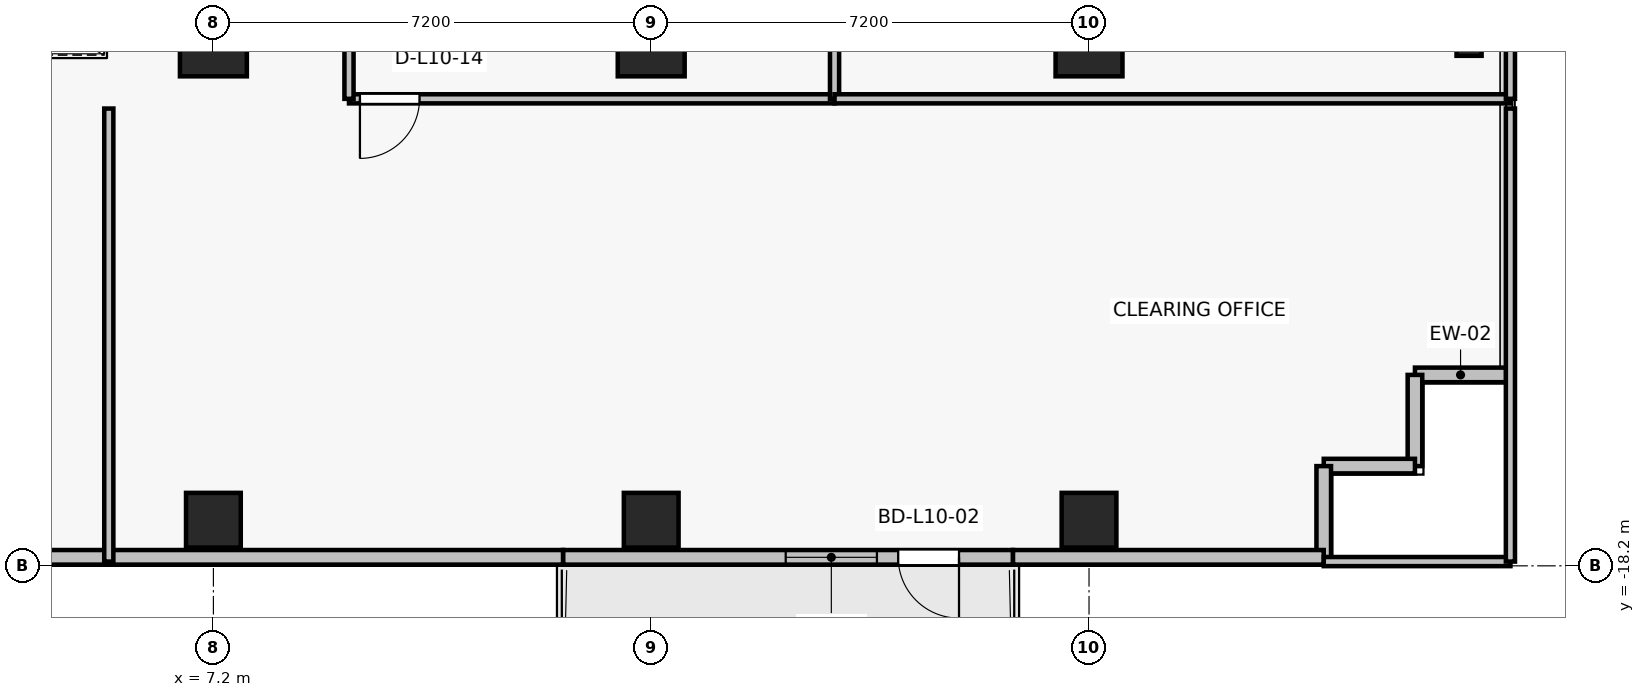
"""IFC4 building model, lengths in metres.
Left out: names, types, materials, properties, quantities, classifications, styles, units other than length and angle.
Written with IfcOpenShell. Run it as: python <this file> out.ifc"""

import sys

from ifc_helpers import new_model, si_unit, direction, frame, frame_2d, origin, origin_2d, place, context, subcontext, project, spatial, rectangle, i_section, extrude, source, transform, mapped, element, fill, save


model = new_model("IFC4")
c1 = context("Model", 3, precision=1e-05, world=origin(), true_north=direction((0.0, 1.0)))
c2 = subcontext(c1, "Body", "Model", "MODEL_VIEW")
j1 = project(units=[si_unit("LENGTHUNIT", "METRE"), si_unit("PLANEANGLEUNIT", "RADIAN")], contexts=[c1])
p1 = place(None, origin())
s1 = spatial("IfcSite", under=j1, at=p1, CompositionType="ELEMENT")
p2 = place(p1, origin())
s2 = spatial("IfcBuilding", under=s1, at=p2, CompositionType="ELEMENT")
p3 = place(p2, frame((0.0, 0.0, 40.6)))
s3 = spatial("IfcBuildingStorey", under=s2, at=p3, CompositionType="ELEMENT", Elevation=40.6)
for number, where, z_axis, x_axis in (
    (1, (7.2, -9.6, 0.0), (0.0, 0.0, 1.0), (1.0, 0.0, 0.0)),
    (2, (14.4, -9.6, 0.0), (0.0, 0.0, 1.0), (1.0, 0.0, 0.0)),
    (3, (21.6, -9.6, 0.0), (0.0, 0.0, 1.0), (1.0, 0.0, 0.0)),
):
    element("IfcColumn", number, at=place(p3, frame(where, z_axis=z_axis, x_axis=x_axis)), inside=s3, PredefinedType="COLUMN", context=c2, shape_type="SweptSolid", body=[
        extrude(rectangle(XDim=1.1, YDim=1.1, at=origin_2d()), origin(), (0.0, 0.0, 1.0), 3.3),
    ])
for number, where, z_axis, x_axis in (
    (4, (7.2, -17.45, 0.0), (0.0, 0.0, 1.0), (1.0, 0.0, 0.0)),
    (5, (14.4, -17.45, 0.0), (0.0, 0.0, 1.0), (1.0, 0.0, 0.0)),
    (6, (21.6, -17.45, 0.0), (0.0, 0.0, 1.0), (1.0, 0.0, 0.0)),
):
    element("IfcColumn", number, at=place(p3, frame(where, z_axis=z_axis, x_axis=x_axis)), inside=s3, PredefinedType="COLUMN", context=c2, shape_type="SweptSolid", body=[
        extrude(rectangle(XDim=0.9, YDim=0.9, at=origin_2d()), origin(), (0.0, 0.0, 1.0), 3.3),
    ])
p4 = place(p3, frame((27.85, -9.6, 0.0), z_axis=(0.0, 0.0, 1.0), x_axis=(1.0, 0.0, 0.0)))
e7 = element("IfcColumn", 7, at=p4, inside=s3, PredefinedType="COLUMN", context=c2, shape_type="SweptSolid", body=[
    extrude(i_section(OverallWidth=0.412, OverallDepth=0.425, WebThickness=0.026, FlangeThickness=0.039, FilletRadius=0.015, at=origin_2d()), origin(), (0.0, 0.0, 1.0), 3.3),
])
p5 = place(p3, frame((20.35, -18.06, 0.0), z_axis=(0.0, 0.0, 1.0), x_axis=(-1.0, 0.0, 0.0)))
e8 = element("IfcWall", 8, at=p5, inside=s3, PredefinedType="SOLIDWALL", context=c2, shape_type="SweptSolid", body=[
    extrude(rectangle(XDim=7.4, YDim=0.24, at=frame_2d((3.7, 0.0))), origin(), (0.0, 0.0, 1.0), 2.665),
])
p6 = place(p5, frame((0.888, 0.0, 0.0)))
e9 = element("IfcOpeningElement", 9, at=p6, cuts=e8, PredefinedType="OPENING", context=c2, shape_type="SweptSolid", body=[
    extrude(rectangle(XDim=1.0, YDim=2.2, at=frame_2d((0.5, 1.1))), frame((0.0, 0.13, 0.0), z_axis=(0.0, -1.0, 0.0), x_axis=(1.0, 0.0, 0.0)), (0.0, 0.0, 1.0), 0.26),
])
p7 = place(p5, frame((2.238, 0.0, 0.85)))
e10 = element("IfcOpeningElement", 10, at=p7, cuts=e8, PredefinedType="OPENING", context=c2, shape_type="SweptSolid", body=[
    extrude(rectangle(XDim=1.5, YDim=1.6, at=frame_2d((0.75, 0.8))), frame((0.0, 0.13, 0.0), z_axis=(0.0, -1.0, 0.0), x_axis=(1.0, 0.0, 0.0)), (0.0, 0.0, 1.0), 0.26),
])
for number, where, z_axis, x_axis in (
    (11, (26.96, -15.06, 0.0), (0.0, 0.0, 1.0), (1.0, 0.0, 0.0)),
    (12, (26.96, -16.56, 0.0), (0.0, 0.0, 1.0), (0.0, 1.0, 0.0)),
    (13, (25.46, -16.56, 0.0), (0.0, 0.0, 1.0), (1.0, 0.0, 0.0)),
    (14, (25.46, -18.06, 0.0), (0.0, 0.0, 1.0), (0.0, 1.0, 0.0)),
):
    element("IfcWall", number, at=place(p3, frame(where, z_axis=z_axis, x_axis=x_axis)), inside=s3, PredefinedType="SOLIDWALL", context=c2, shape_type="SweptSolid", body=[
        extrude(rectangle(XDim=1.5, YDim=0.24, at=frame_2d((0.75, 0.0))), origin(), (0.0, 0.0, 1.0), 3.075),
    ])
p8 = place(p3, frame((20.35, -18.06, 0.0), z_axis=(0.0, 0.0, 1.0), x_axis=(1.0, 0.0, 0.0)))
e15 = element("IfcWall", 15, at=p8, inside=s3, PredefinedType="SOLIDWALL", context=c2, shape_type="SweptSolid", body=[
    extrude(rectangle(XDim=5.11, YDim=0.24, at=frame_2d((2.555, 0.0))), origin(), (0.0, 0.0, 1.0), 3.075),
])
p9 = place(p3, frame((3.34, -18.06, 0.0), z_axis=(0.0, 0.0, 1.0), x_axis=(1.0, 0.0, 0.0)))
e16 = element("IfcWall", 16, at=p9, inside=s3, PredefinedType="SOLIDWALL", context=c2, shape_type="SweptSolid", body=[
    extrude(rectangle(XDim=9.61, YDim=0.24, at=frame_2d((4.805, 0.0))), origin(), (0.0, 0.0, 1.0), 2.665),
])
p10 = place(p3, frame((17.415, -10.52, 0.0), z_axis=(0.0, 0.0, 1.0), x_axis=(-1.0, 0.0, 0.0)))
e17 = element("IfcWall", 17, at=p10, inside=s3, PredefinedType="PARTITIONING", context=c2, shape_type="SweptSolid", body=[
    extrude(rectangle(XDim=7.985, YDim=0.15, at=frame_2d((3.993, 0.0))), origin(), (0.0, 0.0, 1.0), 2.465),
])
p11 = place(p10, frame((6.825, 0.0, 0.0)))
e18 = element("IfcOpeningElement", 18, at=p11, cuts=e17, PredefinedType="OPENING", context=c2, shape_type="SweptSolid", body=[
    extrude(rectangle(XDim=0.98, YDim=2.15, at=frame_2d((0.49, 1.075))), frame((0.0, 0.085, 0.0), z_axis=(0.0, -1.0, 0.0), x_axis=(1.0, 0.0, 0.0)), (0.0, 0.0, 1.0), 0.17),
])
for number, where, z_axis, x_axis in (
    (19, (9.43, -10.52, 0.0), (0.0, 0.0, 1.0), (0.0, 1.0, 0.0)),
    (20, (17.415, -3.83, 0.0), (0.0, 0.0, 1.0), (0.0, -1.0, 0.0)),
):
    element("IfcWall", number, at=place(p3, frame(where, z_axis=z_axis, x_axis=x_axis)), inside=s3, PredefinedType="PARTITIONING", context=c2, shape_type="SweptSolid", body=[
        extrude(rectangle(XDim=6.69, YDim=0.15, at=frame_2d((3.345, 0.0))), origin(), (0.0, 0.0, 1.0), 2.465),
    ])
p12 = place(p3, frame((28.53, -10.52, 0.0), z_axis=(0.0, 0.0, 1.0), x_axis=(-1.0, 0.0, 0.0)))
e21 = element("IfcWall", 21, at=p12, inside=s3, PredefinedType="PARTITIONING", context=c2, shape_type="SweptSolid", body=[
    extrude(rectangle(XDim=11.115, YDim=0.15, at=frame_2d((5.558, 0.0))), origin(), (0.0, 0.0, 1.0), 2.465),
])
p13 = place(p3, frame((28.53, -3.83, 0.0), z_axis=(0.0, 0.0, 1.0), x_axis=(0.0, -1.0, 0.0)))
e22 = element("IfcWall", 22, at=p13, inside=s3, PredefinedType="PARTITIONING", context=c2, shape_type="SweptSolid", body=[
    extrude(rectangle(XDim=6.69, YDim=0.15, at=frame_2d((3.345, 0.0))), origin(), (0.0, 0.0, 1.0), 2.665),
])
p14 = place(p3, frame((28.53, -18.13, 0.0), z_axis=(0.0, 0.0, 1.0), x_axis=(-1.0, 0.0, 0.0)))
e23 = element("IfcWall", 23, at=p14, inside=s3, PredefinedType="PARTITIONING", context=c2, shape_type="SweptSolid", body=[
    extrude(rectangle(XDim=3.07, YDim=0.15, at=frame_2d((1.535, 0.0))), origin(), (0.0, 0.0, 1.0), 2.665),
])
p15 = place(p3, frame((5.48, -18.13, 0.0), z_axis=(0.0, 0.0, 1.0), x_axis=(0.0, 1.0, 0.0)))
e24 = element("IfcWall", 24, at=p15, inside=s3, PredefinedType="PARTITIONING", context=c2, shape_type="SweptSolid", body=[
    extrude(rectangle(XDim=7.45, YDim=0.15, at=frame_2d((3.725, 0.0))), origin(), (0.0, 0.0, 1.0), 2.465),
])
p16 = place(p3, frame((28.53, -10.68, 0.0), z_axis=(0.0, 0.0, 1.0), x_axis=(0.0, -1.0, 0.0)))
e25 = element("IfcWall", 25, at=p16, inside=s3, PredefinedType="PARTITIONING", context=c2, shape_type="SweptSolid", body=[
    extrude(rectangle(XDim=7.45, YDim=0.15, at=frame_2d((3.725, 0.0))), origin(), (0.0, 0.0, 1.0), 3.075),
])
m1 = source(origin(), c2, "Body", "SweptSolid", [
    extrude(rectangle(XDim=1.0, YDim=2.2, at=frame_2d((0.5, 1.1))), frame((0.0, 0.025, 0.0), z_axis=(0.0, -1.0, 0.0), x_axis=(1.0, 0.0, 0.0)), (0.0, 0.0, 1.0), 0.05),
])
p17 = place(p6, origin())
e26 = element("IfcDoor", 26, at=p17, inside=s3, OperationType="SINGLE_SWING_LEFT", PredefinedType="DOOR", context=c2, shape_type="MappedRepresentation", body=[
    mapped(m1, transform((0.0, 0.0, 0.0), x_axis=(1.0, 0.0, 0.0), y_axis=(0.0, 1.0, 0.0), z_axis=(0.0, 0.0, 1.0), scale=1.0)),
])
fill(e9, e26)
m2 = source(origin(), c2, "Body", "SweptSolid", [
    extrude(rectangle(XDim=1.5, YDim=1.6, at=frame_2d((0.75, 0.8))), frame((0.0, 0.03, 0.0), z_axis=(0.0, -1.0, 0.0), x_axis=(1.0, 0.0, 0.0)), (0.0, 0.0, 1.0), 0.06),
])
p18 = place(p7, origin())
e27 = element("IfcWindow", 27, at=p18, inside=s3, PartitioningType="SINGLE_PANEL", PredefinedType="WINDOW", context=c2, shape_type="MappedRepresentation", body=[
    mapped(m2, transform((0.0, 0.0, 0.0), x_axis=(1.0, 0.0, 0.0), y_axis=(0.0, 1.0, 0.0), z_axis=(0.0, 0.0, 1.0), scale=1.0)),
])
fill(e10, e27)
m3 = source(origin(), c2, "Body", "SweptSolid", [
    extrude(rectangle(XDim=0.98, YDim=2.15, at=frame_2d((0.49, 1.075))), frame((0.0, 0.025, 0.0), z_axis=(0.0, -1.0, 0.0), x_axis=(1.0, 0.0, 0.0)), (0.0, 0.0, 1.0), 0.05),
])
p19 = place(p11, origin())
e28 = element("IfcDoor", 28, at=p19, inside=s3, OperationType="SINGLE_SWING_RIGHT", PredefinedType="DOOR", context=c2, shape_type="MappedRepresentation", body=[
    mapped(m3, transform((0.0, 0.0, 0.0), x_axis=(1.0, 0.0, 0.0), y_axis=(0.0, 1.0, 0.0), z_axis=(0.0, 0.0, 1.0), scale=1.0)),
])
fill(e18, e28)
save(model, sys.argv[1])
